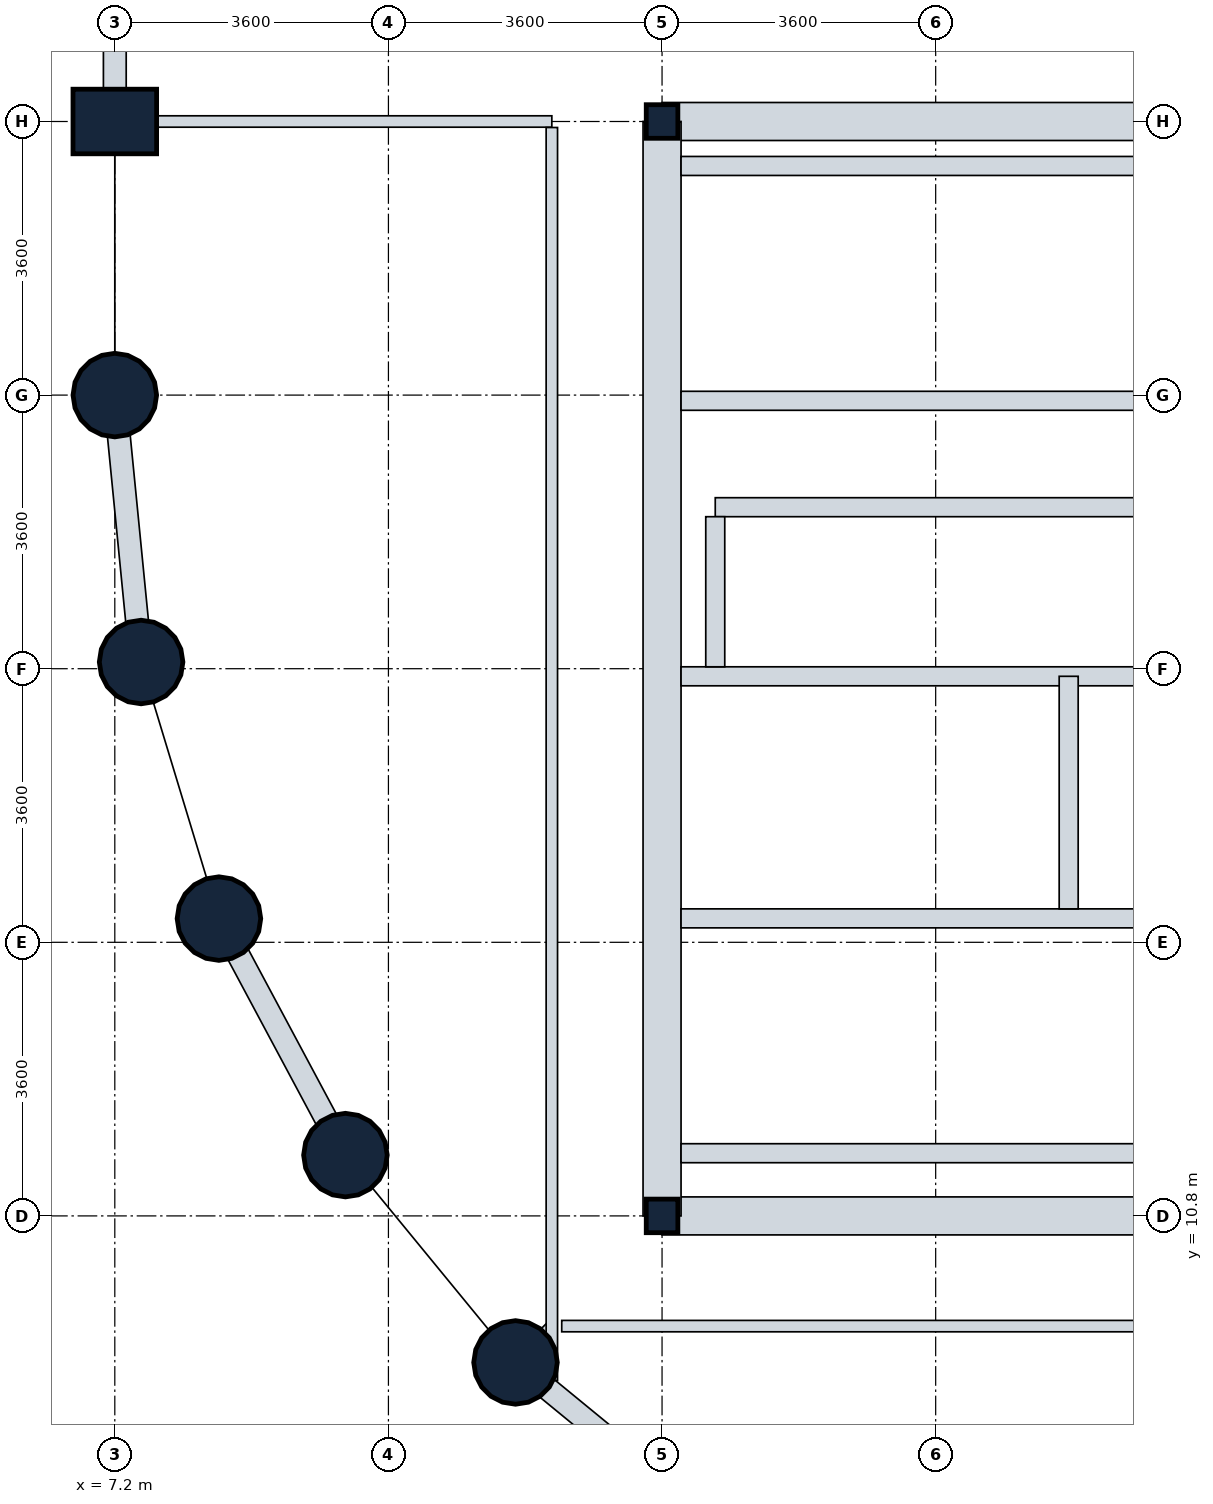
"""IFC4 building model, lengths in metres.
Left out: names, types, materials, properties, quantities, classifications, styles, units other than length and angle.
Written with IfcOpenShell. Run it as: python <this file> out.ifc"""

import sys

from ifc_helpers import new_model, si_unit, direction, frame, frame_2d, origin, origin_2d, place, context, subcontext, project, spatial, rectangle, circle, i_section, extrude, element, fill, save


model = new_model("IFC4")
c1 = context("Model", 3, precision=1e-05, world=origin(), true_north=direction((0.0, 1.0)))
c2 = subcontext(c1, "Body", "Model", "MODEL_VIEW")
j1 = project(units=[si_unit("LENGTHUNIT", "METRE"), si_unit("PLANEANGLEUNIT", "RADIAN")], contexts=[c1])
p1 = place(None, origin())
s1 = spatial("IfcSite", under=j1, at=p1, CompositionType="ELEMENT")
p2 = place(p1, origin())
s2 = spatial("IfcBuilding", under=s1, at=p2, CompositionType="ELEMENT")
p3 = place(p2, frame((0.0, 0.0, 115.2)))
s3 = spatial("IfcBuildingStorey", under=s2, at=p3, CompositionType="ELEMENT", Elevation=115.2)
p4 = place(p3, frame((7.2, 21.6, 0.0), z_axis=(0.0, 0.0, 1.0), x_axis=(1.0, 0.0, 0.0)))
e1 = element("IfcColumn", 1, at=p4, inside=s3, PredefinedType="COLUMN", context=c2, shape_type="SweptSolid", body=[
    extrude(circle(Radius=0.55, at=origin_2d()), origin(), (0.0, 0.0, 1.0), 4.8),
])
p5 = place(p3, frame((7.2, 25.2, 0.0), z_axis=(0.0, 0.0, 1.0), x_axis=(0.0, 1.0, 0.0)))
e2 = element("IfcColumn", 2, at=p5, inside=s3, PredefinedType="COLUMN", context=c2, shape_type="SweptSolid", body=[
    extrude(rectangle(XDim=0.85, YDim=1.1, at=origin_2d()), origin(), (0.0, 0.0, 1.0), 4.8),
])
for number, where, z_axis, x_axis in (
    (3, (7.546, 18.088, 0.0), (0.0, 0.0, 1.0), (1.0, 0.0, 0.0)),
    (4, (8.57, 14.712, 0.0), (0.0, 0.0, 1.0), (1.0, 0.0, 0.0)),
    (5, (10.234, 11.6, 0.0), (0.0, 0.0, 1.0), (1.0, 0.0, 0.0)),
    (6, (12.472, 8.872, 0.0), (0.0, 0.0, 1.0), (1.0, 0.0, 0.0)),
):
    element("IfcColumn", number, at=place(p3, frame(where, z_axis=z_axis, x_axis=x_axis)), inside=s3, PredefinedType="COLUMN", context=c2, shape_type="SweptSolid", body=[
        extrude(circle(Radius=0.55, at=origin_2d()), origin(), (0.0, 0.0, 1.0), 4.8),
    ])
for number, where, z_axis, x_axis in (
    (7, (14.4, 10.8, 0.0), (0.0, 0.0, 1.0), (1.0, 0.0, 0.0)),
    (8, (14.4, 25.2, 0.0), (0.0, 0.0, 1.0), (1.0, 0.0, 0.0)),
):
    element("IfcColumn", number, at=place(p3, frame(where, z_axis=z_axis, x_axis=x_axis)), inside=s3, PredefinedType="COLUMN", context=c2, shape_type="SweptSolid", body=[
        extrude(i_section(OverallWidth=0.416, OverallDepth=0.442, WebThickness=0.025, FlangeThickness=0.041, FilletRadius=0.015, at=origin_2d()), origin(), (0.0, 0.0, 1.0), 4.8),
    ])
p6 = place(p3, frame((7.2, 25.2, 0.0), z_axis=(0.0, 0.0, 1.0), x_axis=(0.0, 1.0, 0.0)))
e9 = element("IfcWall", 9, at=p6, inside=s3, PredefinedType="STANDARD", context=c2, shape_type="SweptSolid", body=[
    extrude(rectangle(XDim=3.6, YDim=0.3, at=frame_2d((1.8, 0.0))), origin(), (0.0, 0.0, 1.0), 3.93),
])
p7 = place(p3, frame((7.546, 18.088, 0.0), z_axis=(0.0, 0.0, 1.0), x_axis=(-0.09802417461, 0.995184033831, 0.0)))
e10 = element("IfcWall", 10, at=p7, inside=s3, PredefinedType="STANDARD", context=c2, shape_type="SweptSolid", body=[
    extrude(rectangle(XDim=3.529, YDim=0.3, at=frame_2d((1.765, 0.0))), origin(), (0.0, 0.0, 1.0), 3.93),
])
p8 = place(p7, frame((0.965, 0.0, 0.85)))
e11 = element("IfcOpeningElement", 11, at=p8, cuts=e10, PredefinedType="OPENING", context=c2, shape_type="SweptSolid", body=[
    extrude(rectangle(XDim=1.6, YDim=1.35, at=frame_2d((0.8, 0.675))), frame((0.0, 0.16, 0.0), z_axis=(0.0, -1.0, 0.0), x_axis=(1.0, 0.0, 0.0)), (0.0, 0.0, 1.0), 0.32),
])
p9 = place(p3, frame((10.234, 11.6, 0.0), z_axis=(0.0, 0.0, 1.0), x_axis=(-0.47151087309, 0.881860247748, 0.0)))
e12 = element("IfcWall", 12, at=p9, inside=s3, PredefinedType="STANDARD", context=c2, shape_type="SweptSolid", body=[
    extrude(rectangle(XDim=3.529, YDim=0.3, at=frame_2d((1.764, 0.0))), origin(), (0.0, 0.0, 1.0), 3.93),
])
p10 = place(p9, frame((0.964, 0.0, 0.85)))
e13 = element("IfcOpeningElement", 13, at=p10, cuts=e12, PredefinedType="OPENING", context=c2, shape_type="SweptSolid", body=[
    extrude(rectangle(XDim=1.6, YDim=1.35, at=frame_2d((0.8, 0.675))), frame((0.0, 0.16, 0.0), z_axis=(0.0, -1.0, 0.0), x_axis=(1.0, 0.0, 0.0)), (0.0, 0.0, 1.0), 0.32),
])
p11 = place(p3, frame((15.2, 6.634, 0.0), z_axis=(0.0, 0.0, 1.0), x_axis=(-0.773121216285, 0.634258295121, 0.0)))
e14 = element("IfcWall", 14, at=p11, inside=s3, PredefinedType="STANDARD", context=c2, shape_type="SweptSolid", body=[
    extrude(rectangle(XDim=3.529, YDim=0.3, at=frame_2d((1.764, 0.0))), origin(), (0.0, 0.0, 1.0), 3.93),
])
p12 = place(p11, frame((0.964, 0.0, 0.85)))
e15 = element("IfcOpeningElement", 15, at=p12, cuts=e14, PredefinedType="OPENING", context=c2, shape_type="SweptSolid", body=[
    extrude(rectangle(XDim=1.6, YDim=1.35, at=frame_2d((0.8, 0.675))), frame((0.0, 0.16, 0.0), z_axis=(0.0, -1.0, 0.0), x_axis=(1.0, 0.0, 0.0)), (0.0, 0.0, 1.0), 0.32),
])
p13 = place(p3, frame((14.4, 10.8, 0.0), z_axis=(0.0, 0.0, 1.0), x_axis=(1.0, 0.0, 0.0)))
e16 = element("IfcWall", 16, at=p13, inside=s3, PredefinedType="SHEAR", context=c2, shape_type="SweptSolid", body=[
    extrude(rectangle(XDim=18.0, YDim=0.5, at=frame_2d((9.0, 0.0))), origin(), (0.0, 0.0, 1.0), 4.55),
])
p14 = place(p3, frame((14.4, 25.2, 0.0), z_axis=(0.0, 0.0, 1.0), x_axis=(1.0, 0.0, 0.0)))
e17 = element("IfcWall", 17, at=p14, inside=s3, PredefinedType="SHEAR", context=c2, shape_type="SweptSolid", body=[
    extrude(rectangle(XDim=14.4, YDim=0.5, at=frame_2d((7.2, 0.0))), origin(), (0.0, 0.0, 1.0), 4.55),
])
p15 = place(p3, frame((14.4, 10.8, 0.0), z_axis=(0.0, 0.0, 1.0), x_axis=(0.0, 1.0, 0.0)))
e18 = element("IfcWall", 18, at=p15, inside=s3, PredefinedType="SHEAR", context=c2, shape_type="SweptSolid", body=[
    extrude(rectangle(XDim=14.4, YDim=0.5, at=frame_2d((7.2, 0.0))), origin(), (0.0, 0.0, 1.0), 4.55),
])
p16 = place(p15, frame((11.05, 0.0, 0.0)))
e19 = element("IfcOpeningElement", 19, at=p16, cuts=e18, PredefinedType="OPENING", context=c2, shape_type="SweptSolid", body=[
    extrude(rectangle(XDim=1.1, YDim=2.1, at=frame_2d((0.55, 1.05))), frame((0.0, 0.26, 0.0), z_axis=(0.0, -1.0, 0.0), x_axis=(1.0, 0.0, 0.0)), (0.0, 0.0, 1.0), 0.52),
])
p17 = place(p15, frame((4.9, 0.0, 0.0)))
e20 = element("IfcOpeningElement", 20, at=p17, cuts=e18, PredefinedType="OPENING", context=c2, shape_type="SweptSolid", body=[
    extrude(rectangle(XDim=1.2, YDim=2.1, at=frame_2d((0.6, 1.05))), frame((0.0, 0.26, 0.0), z_axis=(0.0, -1.0, 0.0), x_axis=(1.0, 0.0, 0.0)), (0.0, 0.0, 1.0), 0.52),
])
p18 = place(p3, frame((14.65, 11.625, 0.0), z_axis=(0.0, 0.0, 1.0), x_axis=(1.0, 0.0, 0.0)))
e21 = element("IfcWall", 21, at=p18, inside=s3, PredefinedType="SHEAR", context=c2, shape_type="SweptSolid", body=[
    extrude(rectangle(XDim=8.7, YDim=0.25, at=frame_2d((4.35, 0.0))), origin(), (0.0, 0.0, 1.0), 4.55),
])
p19 = place(p3, frame((14.65, 14.715, 0.0), z_axis=(0.0, 0.0, 1.0), x_axis=(1.0, 0.0, 0.0)))
e22 = element("IfcWall", 22, at=p19, inside=s3, PredefinedType="SHEAR", context=c2, shape_type="SweptSolid", body=[
    extrude(rectangle(XDim=8.7, YDim=0.25, at=frame_2d((4.35, 0.0))), origin(), (0.0, 0.0, 1.0), 4.55),
])
p20 = place(p19, frame((0.705, 0.0, 0.0)))
e23 = element("IfcOpeningElement", 23, at=p20, cuts=e22, PredefinedType="OPENING", context=c2, shape_type="SweptSolid", body=[
    extrude(rectangle(XDim=1.1, YDim=2.1, at=frame_2d((0.55, 1.05))), frame((0.0, 0.135, 0.0), z_axis=(0.0, -1.0, 0.0), x_axis=(1.0, 0.0, 0.0)), (0.0, 0.0, 1.0), 0.27),
])
for number, where, z_axis, x_axis in (
    (24, (14.65, 21.525, 0.0), (0.0, 0.0, 1.0), (1.0, 0.0, 0.0)),
    (25, (14.65, 24.615, 0.0), (0.0, 0.0, 1.0), (1.0, 0.0, 0.0)),
):
    element("IfcWall", number, at=place(p3, frame(where, z_axis=z_axis, x_axis=x_axis)), inside=s3, PredefinedType="SHEAR", context=c2, shape_type="SweptSolid", body=[
        extrude(rectangle(XDim=8.25, YDim=0.25, at=frame_2d((4.125, 0.0))), origin(), (0.0, 0.0, 1.0), 4.55),
    ])
p21 = place(p3, frame((14.65, 17.9, 0.0), z_axis=(0.0, 0.0, 1.0), x_axis=(1.0, 0.0, 0.0)))
e26 = element("IfcWall", 26, at=p21, inside=s3, PredefinedType="PARTITIONING", context=c2, shape_type="SweptSolid", body=[
    extrude(rectangle(XDim=7.15, YDim=0.25, at=frame_2d((3.575, 0.0))), origin(), (0.0, 0.0, 1.0), 4.535),
])
p22 = place(p3, frame((19.75, 14.84, 0.0), z_axis=(0.0, 0.0, 1.0), x_axis=(0.0, 1.0, 0.0)))
e27 = element("IfcWall", 27, at=p22, inside=s3, PredefinedType="PARTITIONING", context=c2, shape_type="SweptSolid", body=[
    extrude(rectangle(XDim=3.06, YDim=0.25, at=frame_2d((1.53, 0.0))), origin(), (0.0, 0.0, 1.0), 4.535),
])
p23 = place(p22, frame((0.98, 0.0, 0.0)))
e28 = element("IfcOpeningElement", 28, at=p23, cuts=e27, PredefinedType="OPENING", context=c2, shape_type="SweptSolid", body=[
    extrude(rectangle(XDim=1.1, YDim=2.1, at=frame_2d((0.55, 1.05))), frame((0.0, 0.135, 0.0), z_axis=(0.0, -1.0, 0.0), x_axis=(1.0, 0.0, 0.0)), (0.0, 0.0, 1.0), 0.27),
])
p24 = place(p3, frame((15.1, 20.125, 0.0), z_axis=(0.0, 0.0, 1.0), x_axis=(1.0, 0.0, 0.0)))
e29 = element("IfcWall", 29, at=p24, inside=s3, PredefinedType="PARTITIONING", context=c2, shape_type="SweptSolid", body=[
    extrude(rectangle(XDim=7.55, YDim=0.25, at=frame_2d((3.775, 0.0))), origin(), (0.0, 0.0, 1.0), 4.535),
])
p25 = place(p24, frame((0.45, 0.0, 0.0)))
e30 = element("IfcOpeningElement", 30, at=p25, cuts=e29, PredefinedType="OPENING", context=c2, shape_type="SweptSolid", body=[
    extrude(rectangle(XDim=1.1, YDim=2.1, at=frame_2d((0.55, 1.05))), frame((0.0, 0.135, 0.0), z_axis=(0.0, -1.0, 0.0), x_axis=(1.0, 0.0, 0.0)), (0.0, 0.0, 1.0), 0.27),
])
p26 = place(p24, frame((2.3, 0.0, 0.0)))
e31 = element("IfcOpeningElement", 31, at=p26, cuts=e29, PredefinedType="OPENING", context=c2, shape_type="SweptSolid", body=[
    extrude(rectangle(XDim=1.1, YDim=2.1, at=frame_2d((0.55, 1.05))), frame((0.0, 0.135, 0.0), z_axis=(0.0, -1.0, 0.0), x_axis=(1.0, 0.0, 0.0)), (0.0, 0.0, 1.0), 0.27),
])
p27 = place(p24, frame((4.15, 0.0, 0.0)))
e32 = element("IfcOpeningElement", 32, at=p27, cuts=e29, PredefinedType="OPENING", context=c2, shape_type="SweptSolid", body=[
    extrude(rectangle(XDim=1.1, YDim=2.1, at=frame_2d((0.55, 1.05))), frame((0.0, 0.135, 0.0), z_axis=(0.0, -1.0, 0.0), x_axis=(1.0, 0.0, 0.0)), (0.0, 0.0, 1.0), 0.27),
])
p28 = place(p24, frame((6.0, 0.0, 0.0)))
e33 = element("IfcOpeningElement", 33, at=p28, cuts=e29, PredefinedType="OPENING", context=c2, shape_type="SweptSolid", body=[
    extrude(rectangle(XDim=1.1, YDim=2.1, at=frame_2d((0.55, 1.05))), frame((0.0, 0.135, 0.0), z_axis=(0.0, -1.0, 0.0), x_axis=(1.0, 0.0, 0.0)), (0.0, 0.0, 1.0), 0.27),
])
p29 = place(p3, frame((15.1, 18.025, 0.0), z_axis=(0.0, 0.0, 1.0), x_axis=(0.0, 1.0, 0.0)))
e34 = element("IfcWall", 34, at=p29, inside=s3, PredefinedType="PARTITIONING", context=c2, shape_type="SweptSolid", body=[
    extrude(rectangle(XDim=1.975, YDim=0.25, at=frame_2d((0.988, 0.0))), origin(), (0.0, 0.0, 1.0), 4.535),
])
p30 = place(p3, frame((7.354, 25.2, 0.0), z_axis=(0.0, 0.0, 1.0), x_axis=(1.0, 0.0, 0.0)))
e35 = element("IfcWall", 35, at=p30, inside=s3, PredefinedType="PARTITIONING", context=c2, shape_type="SweptSolid", body=[
    extrude(rectangle(XDim=5.596, YDim=0.15, at=frame_2d((2.798, 0.0))), origin(), (0.0, 0.0, 1.0), 4.535),
])
p31 = place(p3, frame((12.95, 9.35, 0.0), z_axis=(0.0, 0.0, 1.0), x_axis=(-0.707106781187, -0.707106781187, 0.0)))
e36 = element("IfcWall", 36, at=p31, inside=s3, PredefinedType="PARTITIONING", context=c2, shape_type="SweptSolid", body=[
    extrude(rectangle(XDim=0.522, YDim=0.15, at=frame_2d((0.261, 0.0))), origin(), (0.0, 0.0, 1.0), 4.09),
])
p32 = place(p3, frame((12.95, 8.634, 0.0), z_axis=(0.0, 0.0, 1.0), x_axis=(0.0, 1.0, 0.0)))
e37 = element("IfcWall", 37, at=p32, inside=s3, PredefinedType="PARTITIONING", context=c2, shape_type="SweptSolid", body=[
    extrude(rectangle(XDim=16.487, YDim=0.15, at=frame_2d((8.244, 0.0))), origin(), (0.0, 0.0, 1.0), 3.93),
])
p33 = place(p32, frame((7.706, 0.0, 0.0)))
e38 = element("IfcOpeningElement", 38, at=p33, cuts=e37, PredefinedType="OPENING", context=c2, shape_type="SweptSolid", body=[
    extrude(rectangle(XDim=1.0, YDim=2.1, at=frame_2d((0.5, 1.05))), frame((0.0, 0.085, 0.0), z_axis=(0.0, -1.0, 0.0), x_axis=(1.0, 0.0, 0.0)), (0.0, 0.0, 1.0), 0.17),
])
p34 = place(p3, frame((13.08, 9.35, 0.0), z_axis=(0.0, 0.0, 1.0), x_axis=(1.0, 0.0, 0.0)))
e39 = element("IfcWall", 39, at=p34, inside=s3, PredefinedType="PARTITIONING", context=c2, shape_type="SweptSolid", body=[
    extrude(rectangle(XDim=15.641, YDim=0.15, at=frame_2d((7.82, 0.0))), origin(), (0.0, 0.0, 1.0), 4.08),
])
p35 = place(p34, frame((4.706, 0.0, 0.0)))
e40 = element("IfcOpeningElement", 40, at=p35, cuts=e39, PredefinedType="OPENING", context=c2, shape_type="SweptSolid", body=[
    extrude(rectangle(XDim=1.0, YDim=2.1, at=frame_2d((0.5, 1.05))), frame((0.0, 0.085, 0.0), z_axis=(0.0, -1.0, 0.0), x_axis=(1.0, 0.0, 0.0)), (0.0, 0.0, 1.0), 0.17),
])
p36 = place(p8, origin())
e41 = element("IfcWindow", 41, at=p36, inside=s3, PartitioningType="SINGLE_PANEL", PredefinedType="WINDOW", context=c2, shape_type="SweptSolid", body=[
    extrude(rectangle(XDim=1.6, YDim=1.35, at=frame_2d((0.8, 0.675))), frame((0.0, 0.03, 0.0), z_axis=(0.0, -1.0, 0.0), x_axis=(1.0, 0.0, 0.0)), (0.0, 0.0, 1.0), 0.06),
])
fill(e11, e41)
p37 = place(p10, origin())
e42 = element("IfcWindow", 42, at=p37, inside=s3, PartitioningType="SINGLE_PANEL", PredefinedType="WINDOW", context=c2, shape_type="SweptSolid", body=[
    extrude(rectangle(XDim=1.6, YDim=1.35, at=frame_2d((0.8, 0.675))), frame((0.0, 0.03, 0.0), z_axis=(0.0, -1.0, 0.0), x_axis=(1.0, 0.0, 0.0)), (0.0, 0.0, 1.0), 0.06),
])
fill(e13, e42)
p38 = place(p12, origin())
e43 = element("IfcWindow", 43, at=p38, inside=s3, PartitioningType="SINGLE_PANEL", PredefinedType="WINDOW", context=c2, shape_type="SweptSolid", body=[
    extrude(rectangle(XDim=1.6, YDim=1.35, at=frame_2d((0.8, 0.675))), frame((0.0, 0.03, 0.0), z_axis=(0.0, -1.0, 0.0), x_axis=(1.0, 0.0, 0.0)), (0.0, 0.0, 1.0), 0.06),
])
fill(e15, e43)
p39 = place(p20, origin())
e44 = element("IfcDoor", 44, at=p39, inside=s3, OperationType="SINGLE_SWING_LEFT", PredefinedType="DOOR", context=c2, shape_type="SweptSolid", body=[
    extrude(rectangle(XDim=1.1, YDim=2.1, at=frame_2d((0.55, 1.05))), frame((0.0, 0.025, 0.0), z_axis=(0.0, -1.0, 0.0), x_axis=(1.0, 0.0, 0.0)), (0.0, 0.0, 1.0), 0.05),
])
fill(e23, e44)
p40 = place(p16, origin())
e45 = element("IfcDoor", 45, at=p40, inside=s3, OperationType="SINGLE_SWING_RIGHT", PredefinedType="DOOR", context=c2, shape_type="SweptSolid", body=[
    extrude(rectangle(XDim=1.1, YDim=2.1, at=frame_2d((0.55, 1.05))), frame((0.0, 0.025, 0.0), z_axis=(0.0, -1.0, 0.0), x_axis=(1.0, 0.0, 0.0)), (0.0, 0.0, 1.0), 0.05),
])
fill(e19, e45)
p41 = place(p23, origin())
e46 = element("IfcDoor", 46, at=p41, inside=s3, OperationType="SLIDING_TO_LEFT", PredefinedType="DOOR", context=c2, shape_type="SweptSolid", body=[
    extrude(rectangle(XDim=1.1, YDim=2.1, at=frame_2d((0.55, 1.05))), frame((0.0, 0.025, 0.0), z_axis=(0.0, -1.0, 0.0), x_axis=(1.0, 0.0, 0.0)), (0.0, 0.0, 1.0), 0.05),
])
fill(e28, e46)
p42 = place(p17, origin())
e47 = element("IfcDoor", 47, at=p42, inside=s3, OperationType="SINGLE_SWING_RIGHT", PredefinedType="DOOR", context=c2, shape_type="SweptSolid", body=[
    extrude(rectangle(XDim=1.2, YDim=2.1, at=frame_2d((0.6, 1.05))), frame((0.0, 0.025, 0.0), z_axis=(0.0, -1.0, 0.0), x_axis=(1.0, 0.0, 0.0)), (0.0, 0.0, 1.0), 0.05),
])
fill(e20, e47)
p43 = place(p25, origin())
e48 = element("IfcDoor", 48, at=p43, inside=s3, OperationType="SLIDING_TO_LEFT", PredefinedType="DOOR", context=c2, shape_type="SweptSolid", body=[
    extrude(rectangle(XDim=1.1, YDim=2.1, at=frame_2d((0.55, 1.05))), frame((0.0, 0.025, 0.0), z_axis=(0.0, -1.0, 0.0), x_axis=(1.0, 0.0, 0.0)), (0.0, 0.0, 1.0), 0.05),
])
fill(e30, e48)
p44 = place(p26, origin())
e49 = element("IfcDoor", 49, at=p44, inside=s3, OperationType="SLIDING_TO_LEFT", PredefinedType="DOOR", context=c2, shape_type="SweptSolid", body=[
    extrude(rectangle(XDim=1.1, YDim=2.1, at=frame_2d((0.55, 1.05))), frame((0.0, 0.025, 0.0), z_axis=(0.0, -1.0, 0.0), x_axis=(1.0, 0.0, 0.0)), (0.0, 0.0, 1.0), 0.05),
])
fill(e31, e49)
p45 = place(p27, origin())
e50 = element("IfcDoor", 50, at=p45, inside=s3, OperationType="SLIDING_TO_LEFT", PredefinedType="DOOR", context=c2, shape_type="SweptSolid", body=[
    extrude(rectangle(XDim=1.1, YDim=2.1, at=frame_2d((0.55, 1.05))), frame((0.0, 0.025, 0.0), z_axis=(0.0, -1.0, 0.0), x_axis=(1.0, 0.0, 0.0)), (0.0, 0.0, 1.0), 0.05),
])
fill(e32, e50)
p46 = place(p33, origin())
e51 = element("IfcDoor", 51, at=p46, inside=s3, OperationType="SINGLE_SWING_LEFT", PredefinedType="DOOR", context=c2, shape_type="SweptSolid", body=[
    extrude(rectangle(XDim=1.0, YDim=2.1, at=frame_2d((0.5, 1.05))), frame((0.0, 0.025, 0.0), z_axis=(0.0, -1.0, 0.0), x_axis=(1.0, 0.0, 0.0)), (0.0, 0.0, 1.0), 0.05),
])
fill(e38, e51)
p47 = place(p35, origin())
e52 = element("IfcDoor", 52, at=p47, inside=s3, OperationType="SINGLE_SWING_RIGHT", PredefinedType="DOOR", context=c2, shape_type="SweptSolid", body=[
    extrude(rectangle(XDim=1.0, YDim=2.1, at=frame_2d((0.5, 1.05))), frame((0.0, 0.025, 0.0), z_axis=(0.0, -1.0, 0.0), x_axis=(1.0, 0.0, 0.0)), (0.0, 0.0, 1.0), 0.05),
])
fill(e40, e52)
save(model, sys.argv[1])
